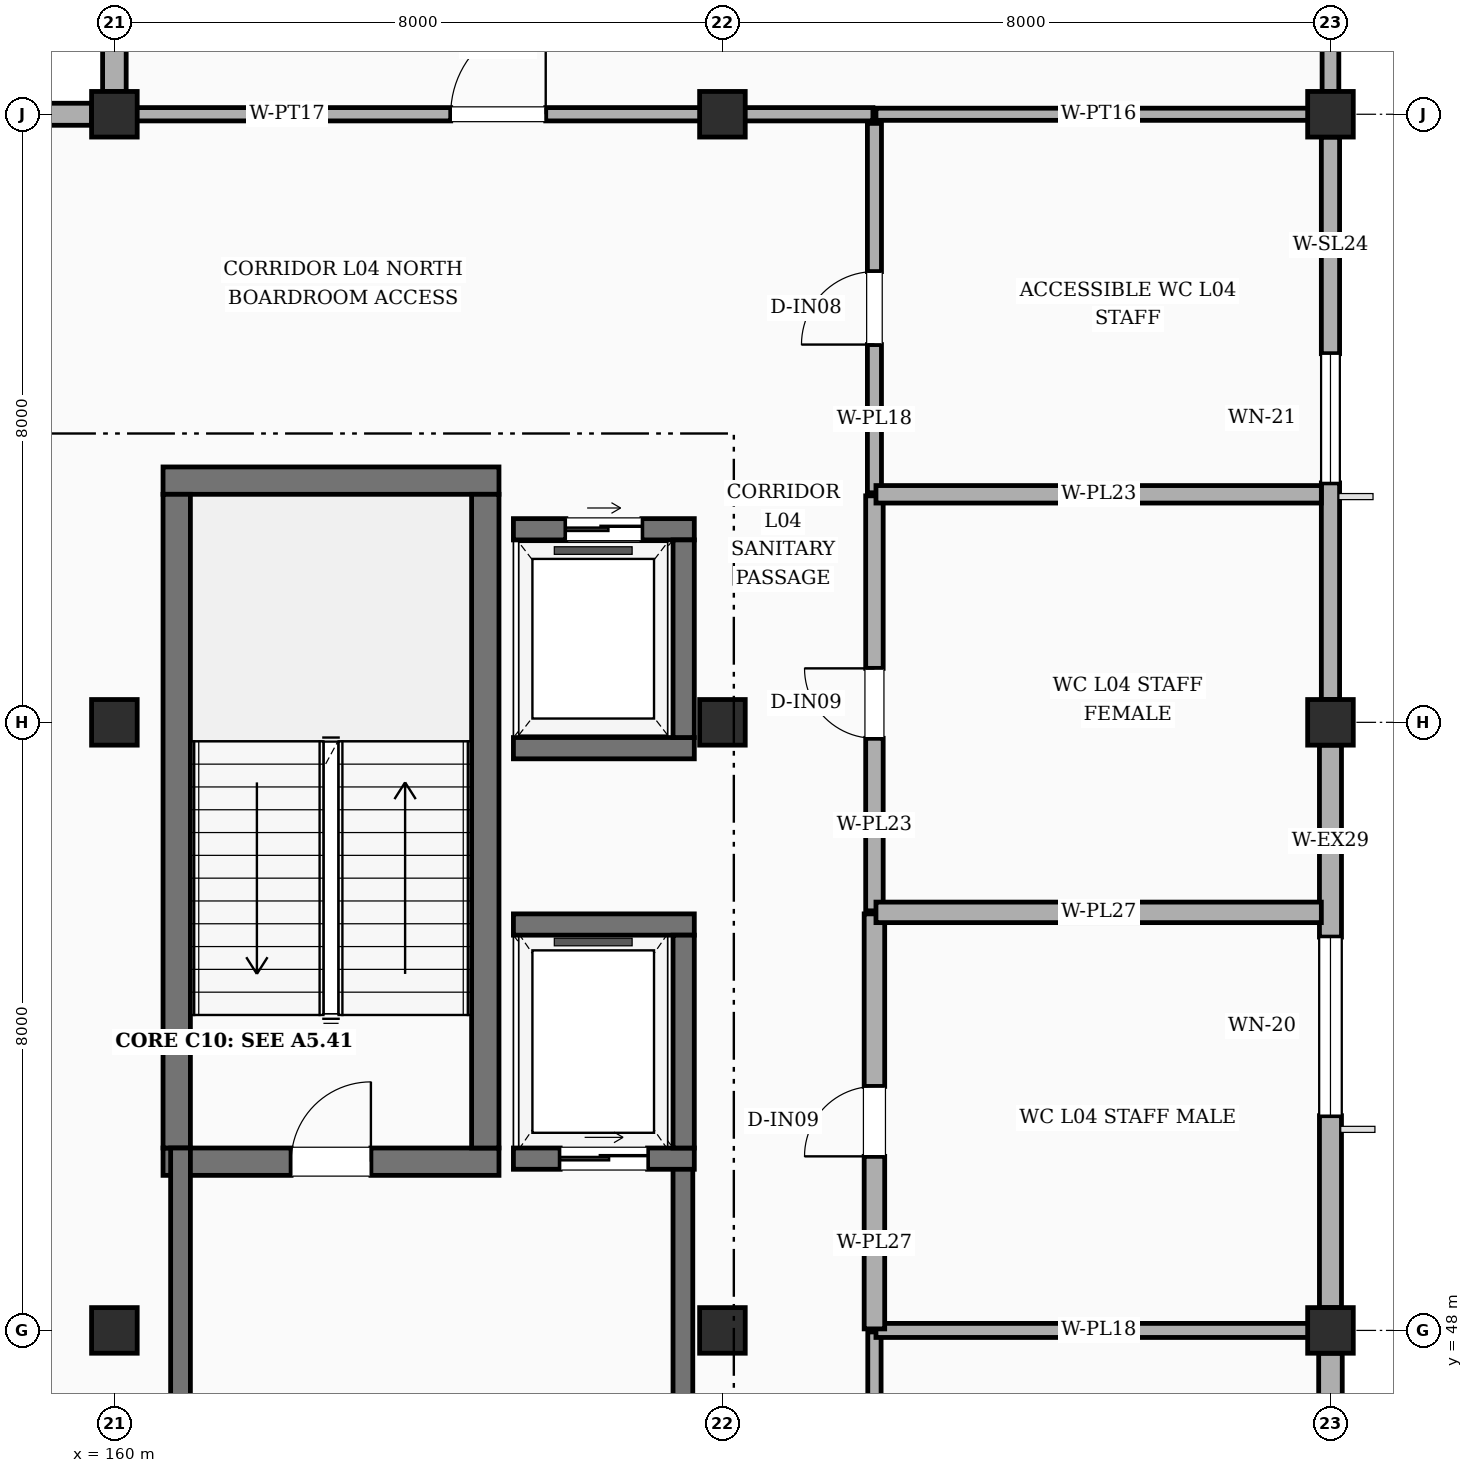
"""IFC4 building model, lengths in metres.
Left out: names, types, materials, properties, quantities, classifications, styles, units other than length and angle.
Written with IfcOpenShell. Run it as: python <this file> out.ifc"""

import sys

from ifc_helpers import new_model, si_unit, direction, frame, frame_2d, origin, origin_2d, place, context, subcontext, project, spatial, rectangle, extrude, element, fill, save


model = new_model("IFC4")
c1 = context("Model", 3, precision=1e-05, world=origin(), true_north=direction((0.0, 1.0)))
c2 = subcontext(c1, "Body", "Model", "MODEL_VIEW")
j1 = project(units=[si_unit("LENGTHUNIT", "METRE"), si_unit("PLANEANGLEUNIT", "RADIAN")], contexts=[c1])
p1 = place(None, origin())
s1 = spatial("IfcSite", under=j1, at=p1, CompositionType="ELEMENT")
p2 = place(p1, origin())
s2 = spatial("IfcBuilding", under=s1, at=p2, CompositionType="ELEMENT")
p3 = place(p2, frame((0.0, 0.0, 19.2)))
s3 = spatial("IfcBuildingStorey", under=s2, at=p3, CompositionType="ELEMENT", Elevation=19.2)
for number, where, z_axis, x_axis in (
    (1, (160.0, 48.0, 0.0), (0.0, 0.0, 1.0), (1.0, 0.0, 0.0)),
    (2, (160.0, 56.0, 0.0), (0.0, 0.0, 1.0), (1.0, 0.0, 0.0)),
    (3, (160.0, 64.0, 0.0), (0.0, 0.0, 1.0), (1.0, 0.0, 0.0)),
    (4, (168.0, 48.0, 0.0), (0.0, 0.0, 1.0), (1.0, 0.0, 0.0)),
    (5, (168.0, 56.0, 0.0), (0.0, 0.0, 1.0), (1.0, 0.0, 0.0)),
    (6, (168.0, 64.0, 0.0), (0.0, 0.0, 1.0), (1.0, 0.0, 0.0)),
    (7, (176.0, 48.0, 0.0), (0.0, 0.0, 1.0), (1.0, 0.0, 0.0)),
    (8, (176.0, 56.0, 0.0), (0.0, 0.0, 1.0), (1.0, 0.0, 0.0)),
    (9, (176.0, 64.0, 0.0), (0.0, 0.0, 1.0), (1.0, 0.0, 0.0)),
):
    element("IfcColumn", number, at=place(p3, frame(where, z_axis=z_axis, x_axis=x_axis)), inside=s3, PredefinedType="COLUMN", context=c2, shape_type="SweptSolid", body=[
        extrude(rectangle(XDim=0.6, YDim=0.6, at=origin_2d()), origin(), (0.0, 0.0, 1.0), 4.2),
    ])
p4 = place(p3, frame((176.0, 40.3, 0.0), z_axis=(0.0, 0.0, 1.0), x_axis=(0.0, 1.0, 0.0)))
e10 = element("IfcWall", 10, at=p4, inside=s3, PredefinedType="STANDARD", context=c2, shape_type="SweptSolid", body=[
    extrude(rectangle(XDim=7.4, YDim=0.31, at=frame_2d((3.7, 0.0))), origin(), (0.0, 0.0, 1.0), 3.57),
])
p5 = place(p4, frame((2.85, 0.0, 0.95)))
e11 = element("IfcOpeningElement", 11, at=p5, cuts=e10, PredefinedType="OPENING", context=c2, shape_type="SweptSolid", body=[
    extrude(rectangle(XDim=1.7, YDim=1.65, at=frame_2d((0.85, 0.825))), frame((0.0, 0.165, 0.0), z_axis=(0.0, -1.0, 0.0), x_axis=(1.0, 0.0, 0.0)), (0.0, 0.0, 1.0), 0.33),
])
p6 = place(p3, frame((176.0, 48.3, 0.0), z_axis=(0.0, 0.0, 1.0), x_axis=(0.0, 1.0, 0.0)))
e12 = element("IfcWall", 12, at=p6, inside=s3, PredefinedType="STANDARD", context=c2, shape_type="SweptSolid", body=[
    extrude(rectangle(XDim=7.4, YDim=0.29, at=frame_2d((3.7, 0.0))), origin(), (0.0, 0.0, 1.0), 3.57),
])
p7 = place(p6, frame((2.525, 0.0, 0.95)))
e13 = element("IfcOpeningElement", 13, at=p7, cuts=e12, PredefinedType="OPENING", context=c2, shape_type="SweptSolid", body=[
    extrude(rectangle(XDim=2.35, YDim=1.65, at=frame_2d((1.175, 0.825))), frame((0.0, 0.155, 0.0), z_axis=(0.0, -1.0, 0.0), x_axis=(1.0, 0.0, 0.0)), (0.0, 0.0, 1.0), 0.31),
])
p8 = place(p3, frame((176.0, 56.3, 0.0), z_axis=(0.0, 0.0, 1.0), x_axis=(0.0, 1.0, 0.0)))
e14 = element("IfcWall", 14, at=p8, inside=s3, PredefinedType="SOLIDWALL", context=c2, shape_type="SweptSolid", body=[
    extrude(rectangle(XDim=7.4, YDim=0.24, at=frame_2d((3.7, 0.0))), origin(), (0.0, 0.0, 1.0), 3.57),
])
p9 = place(p8, frame((2.85, 0.0, 0.95)))
e15 = element("IfcOpeningElement", 15, at=p9, cuts=e14, PredefinedType="OPENING", context=c2, shape_type="SweptSolid", body=[
    extrude(rectangle(XDim=1.7, YDim=1.65, at=frame_2d((0.85, 0.825))), frame((0.0, 0.13, 0.0), z_axis=(0.0, -1.0, 0.0), x_axis=(1.0, 0.0, 0.0)), (0.0, 0.0, 1.0), 0.26),
])
p10 = place(p3, frame((176.0, 64.3, 0.0), z_axis=(0.0, 0.0, 1.0), x_axis=(0.0, 1.0, 0.0)))
e16 = element("IfcWall", 16, at=p10, inside=s3, PredefinedType="SOLIDWALL", context=c2, shape_type="SweptSolid", body=[
    extrude(rectangle(XDim=7.4, YDim=0.22, at=frame_2d((3.7, 0.0))), origin(), (0.0, 0.0, 1.0), 3.57),
])
p11 = place(p10, frame((2.525, 0.0, 0.95)))
e17 = element("IfcOpeningElement", 17, at=p11, cuts=e16, PredefinedType="OPENING", context=c2, shape_type="SweptSolid", body=[
    extrude(rectangle(XDim=2.35, YDim=1.65, at=frame_2d((1.175, 0.825))), frame((0.0, 0.12, 0.0), z_axis=(0.0, -1.0, 0.0), x_axis=(1.0, 0.0, 0.0)), (0.0, 0.0, 1.0), 0.24),
])
p12 = place(p3, frame((160.0, 71.7, 0.0), z_axis=(0.0, 0.0, 1.0), x_axis=(0.0, -1.0, 0.0)))
e18 = element("IfcWall", 18, at=p12, inside=s3, PredefinedType="STANDARD", context=c2, shape_type="SweptSolid", body=[
    extrude(rectangle(XDim=7.4, YDim=0.31, at=frame_2d((3.7, 0.0))), origin(), (0.0, 0.0, 1.0), 3.57),
])
p13 = place(p12, frame((2.85, 0.0, 0.95)))
e19 = element("IfcOpeningElement", 19, at=p13, cuts=e18, PredefinedType="OPENING", context=c2, shape_type="SweptSolid", body=[
    extrude(rectangle(XDim=1.7, YDim=1.65, at=frame_2d((0.85, 0.825))), frame((0.0, 0.165, 0.0), z_axis=(0.0, -1.0, 0.0), x_axis=(1.0, 0.0, 0.0)), (0.0, 0.0, 1.0), 0.33),
])
p14 = place(p3, frame((159.7, 64.0, 0.0), z_axis=(0.0, 0.0, 1.0), x_axis=(-1.0, 0.0, 0.0)))
e20 = element("IfcWall", 20, at=p14, inside=s3, PredefinedType="STANDARD", context=c2, shape_type="SweptSolid", body=[
    extrude(rectangle(XDim=7.4, YDim=0.29, at=frame_2d((3.7, 0.0))), origin(), (0.0, 0.0, 1.0), 3.57),
])
p15 = place(p14, frame((2.525, 0.0, 0.95)))
e21 = element("IfcOpeningElement", 21, at=p15, cuts=e20, PredefinedType="OPENING", context=c2, shape_type="SweptSolid", body=[
    extrude(rectangle(XDim=2.35, YDim=1.65, at=frame_2d((1.175, 0.825))), frame((0.0, 0.155, 0.0), z_axis=(0.0, -1.0, 0.0), x_axis=(1.0, 0.0, 0.0)), (0.0, 0.0, 1.0), 0.31),
])
p16 = place(p3, frame((160.64, 50.22, 0.0), z_axis=(0.0, 0.0, 1.0), x_axis=(1.0, 0.0, 0.0)))
e22 = element("IfcWall", 22, at=p16, inside=s3, PredefinedType="SHEAR", context=c2, shape_type="SweptSolid", body=[
    extrude(rectangle(XDim=4.42, YDim=0.36, at=frame_2d((2.21, 0.0))), origin(), (0.0, 0.0, 1.0), 4.2),
])
p17 = place(p16, frame((1.685, 0.0, 0.0)))
e23 = element("IfcOpeningElement", 23, at=p17, cuts=e22, PredefinedType="OPENING", context=c2, shape_type="SweptSolid", body=[
    extrude(rectangle(XDim=1.05, YDim=2.15, at=frame_2d((0.525, 1.075))), frame((0.0, 0.19, 0.0), z_axis=(0.0, -1.0, 0.0), x_axis=(1.0, 0.0, 0.0)), (0.0, 0.0, 1.0), 0.38),
])
p18 = place(p3, frame((160.64, 59.18, 0.0), z_axis=(0.0, 0.0, 1.0), x_axis=(1.0, 0.0, 0.0)))
e24 = element("IfcWall", 24, at=p18, inside=s3, PredefinedType="SHEAR", context=c2, shape_type="SweptSolid", body=[
    extrude(rectangle(XDim=4.42, YDim=0.36, at=frame_2d((2.21, 0.0))), origin(), (0.0, 0.0, 1.0), 4.2),
])
for number, where, z_axis, x_axis in (
    (25, (160.82, 50.4, 0.0), (0.0, 0.0, 1.0), (0.0, 1.0, 0.0)),
    (26, (164.88, 50.4, 0.0), (0.0, 0.0, 1.0), (0.0, 1.0, 0.0)),
):
    element("IfcWall", number, at=place(p3, frame(where, z_axis=z_axis, x_axis=x_axis)), inside=s3, PredefinedType="SHEAR", context=c2, shape_type="SweptSolid", body=[
        extrude(rectangle(XDim=8.6, YDim=0.36, at=frame_2d((4.3, 0.0))), origin(), (0.0, 0.0, 1.0), 4.2),
    ])
for number, where, z_axis, x_axis in (
    (27, (160.87, 46.54, 0.0), (0.0, 0.0, 1.0), (0.0, 1.0, 0.0)),
    (28, (167.48, 46.54, 0.0), (0.0, 0.0, 1.0), (0.0, 1.0, 0.0)),
):
    element("IfcWall", number, at=place(p3, frame(where, z_axis=z_axis, x_axis=x_axis)), inside=s3, PredefinedType="SHEAR", context=c2, shape_type="SweptSolid", body=[
        extrude(rectangle(XDim=3.86, YDim=0.26, at=frame_2d((1.93, 0.0))), origin(), (0.0, 0.0, 1.0), 4.2),
    ])
p19 = place(p3, frame((165.25, 50.26, 0.0), z_axis=(0.0, 0.0, 1.0), x_axis=(1.0, 0.0, 0.0)))
e29 = element("IfcWall", 29, at=p19, inside=s3, PredefinedType="SHEAR", context=c2, shape_type="SweptSolid", body=[
    extrude(rectangle(XDim=2.38, YDim=0.28, at=frame_2d((1.19, 0.0))), origin(), (0.0, 0.0, 1.0), 4.2),
])
p20 = place(p19, frame((0.615, 0.0, 0.0)))
e30 = element("IfcOpeningElement", 30, at=p20, cuts=e29, PredefinedType="OPENING", context=c2, shape_type="SweptSolid", body=[
    extrude(rectangle(XDim=1.15, YDim=2.2, at=frame_2d((0.575, 1.1))), frame((0.0, 0.15, 0.0), z_axis=(0.0, -1.0, 0.0), x_axis=(1.0, 0.0, 0.0)), (0.0, 0.0, 1.0), 0.3),
])
p21 = place(p3, frame((165.25, 53.34, 0.0), z_axis=(0.0, 0.0, 1.0), x_axis=(1.0, 0.0, 0.0)))
e31 = element("IfcWall", 31, at=p21, inside=s3, PredefinedType="SHEAR", context=c2, shape_type="SweptSolid", body=[
    extrude(rectangle(XDim=2.38, YDim=0.28, at=frame_2d((1.19, 0.0))), origin(), (0.0, 0.0, 1.0), 4.2),
])
p22 = place(p3, frame((167.49, 50.4, 0.0), z_axis=(0.0, 0.0, 1.0), x_axis=(0.0, 1.0, 0.0)))
e32 = element("IfcWall", 32, at=p22, inside=s3, PredefinedType="SHEAR", context=c2, shape_type="SweptSolid", body=[
    extrude(rectangle(XDim=2.8, YDim=0.28, at=frame_2d((1.4, 0.0))), origin(), (0.0, 0.0, 1.0), 4.2),
])
p23 = place(p3, frame((165.25, 55.66, 0.0), z_axis=(0.0, 0.0, 1.0), x_axis=(1.0, 0.0, 0.0)))
e33 = element("IfcWall", 33, at=p23, inside=s3, PredefinedType="SHEAR", context=c2, shape_type="SweptSolid", body=[
    extrude(rectangle(XDim=2.38, YDim=0.28, at=frame_2d((1.19, 0.0))), origin(), (0.0, 0.0, 1.0), 4.2),
])
p24 = place(p3, frame((165.25, 58.54, 0.0), z_axis=(0.0, 0.0, 1.0), x_axis=(1.0, 0.0, 0.0)))
e34 = element("IfcWall", 34, at=p24, inside=s3, PredefinedType="SHEAR", context=c2, shape_type="SweptSolid", body=[
    extrude(rectangle(XDim=2.38, YDim=0.28, at=frame_2d((1.19, 0.0))), origin(), (0.0, 0.0, 1.0), 4.2),
])
p25 = place(p24, frame((0.69, 0.0, 0.0)))
e35 = element("IfcOpeningElement", 35, at=p25, cuts=e34, PredefinedType="OPENING", context=c2, shape_type="SweptSolid", body=[
    extrude(rectangle(XDim=1.0, YDim=2.15, at=frame_2d((0.5, 1.075))), frame((0.0, 0.15, 0.0), z_axis=(0.0, -1.0, 0.0), x_axis=(1.0, 0.0, 0.0)), (0.0, 0.0, 1.0), 0.3),
])
p26 = place(p3, frame((167.49, 55.8, 0.0), z_axis=(0.0, 0.0, 1.0), x_axis=(0.0, 1.0, 0.0)))
e36 = element("IfcWall", 36, at=p26, inside=s3, PredefinedType="SHEAR", context=c2, shape_type="SweptSolid", body=[
    extrude(rectangle(XDim=2.6, YDim=0.28, at=frame_2d((1.3, 0.0))), origin(), (0.0, 0.0, 1.0), 4.2),
])
p27 = place(p3, frame((170.0, 24.02, 0.0), z_axis=(0.0, 0.0, 1.0), x_axis=(0.0, 1.0, 0.0)))
e37 = element("IfcWall", 37, at=p27, inside=s3, PredefinedType="PARTITIONING", context=c2, shape_type="SweptSolid", body=[
    extrude(rectangle(XDim=23.96, YDim=0.175, at=frame_2d((11.98, 0.0))), origin(), (0.0, 0.0, 1.0), 3.37),
])
p28 = place(p27, frame((11.44, 0.0, 0.0)))
e38 = element("IfcOpeningElement", 38, at=p28, cuts=e37, PredefinedType="OPENING", context=c2, shape_type="SweptSolid", body=[
    extrude(rectangle(XDim=1.08, YDim=2.15, at=frame_2d((0.54, 1.075))), frame((0.0, 0.097, 0.0), z_axis=(0.0, -1.0, 0.0), x_axis=(1.0, 0.0, 0.0)), (0.0, 0.0, 1.0), 0.195),
])
p29 = place(p3, frame((170.02, 48.0, 0.0), z_axis=(0.0, 0.0, 1.0), x_axis=(1.0, 0.0, 0.0)))
e39 = element("IfcWall", 39, at=p29, inside=s3, PredefinedType="PLUMBINGWALL", context=c2, shape_type="SweptSolid", body=[
    extrude(rectangle(XDim=5.86, YDim=0.185, at=frame_2d((2.93, 0.0))), origin(), (0.0, 0.0, 1.0), 3.37),
])
p30 = place(p3, frame((170.0, 48.02, 0.0), z_axis=(0.0, 0.0, 1.0), x_axis=(0.0, 1.0, 0.0)))
e40 = element("IfcWall", 40, at=p30, inside=s3, PredefinedType="PLUMBINGWALL", context=c2, shape_type="SweptSolid", body=[
    extrude(rectangle(XDim=5.46, YDim=0.27, at=frame_2d((2.73, 0.0))), origin(), (0.0, 0.0, 1.0), 3.37),
])
p31 = place(p30, frame((2.27, 0.0, 0.0)))
e41 = element("IfcOpeningElement", 41, at=p31, cuts=e40, PredefinedType="OPENING", context=c2, shape_type="SweptSolid", body=[
    extrude(rectangle(XDim=0.92, YDim=2.1, at=frame_2d((0.46, 1.05))), frame((0.0, 0.145, 0.0), z_axis=(0.0, -1.0, 0.0), x_axis=(1.0, 0.0, 0.0)), (0.0, 0.0, 1.0), 0.29),
])
p32 = place(p3, frame((170.0, 53.52, 0.0), z_axis=(0.0, 0.0, 1.0), x_axis=(0.0, 1.0, 0.0)))
e42 = element("IfcWall", 42, at=p32, inside=s3, PredefinedType="PLUMBINGWALL", context=c2, shape_type="SweptSolid", body=[
    extrude(rectangle(XDim=5.46, YDim=0.23, at=frame_2d((2.73, 0.0))), origin(), (0.0, 0.0, 1.0), 3.37),
])
p33 = place(p32, frame((2.27, 0.0, 0.0)))
e43 = element("IfcOpeningElement", 43, at=p33, cuts=e42, PredefinedType="OPENING", context=c2, shape_type="SweptSolid", body=[
    extrude(rectangle(XDim=0.92, YDim=2.1, at=frame_2d((0.46, 1.05))), frame((0.0, 0.125, 0.0), z_axis=(0.0, -1.0, 0.0), x_axis=(1.0, 0.0, 0.0)), (0.0, 0.0, 1.0), 0.25),
])
p34 = place(p3, frame((170.0, 59.02, 0.0), z_axis=(0.0, 0.0, 1.0), x_axis=(0.0, 1.0, 0.0)))
e44 = element("IfcWall", 44, at=p34, inside=s3, PredefinedType="PLUMBINGWALL", context=c2, shape_type="SweptSolid", body=[
    extrude(rectangle(XDim=4.86, YDim=0.185, at=frame_2d((2.43, 0.0))), origin(), (0.0, 0.0, 1.0), 3.37),
])
p35 = place(p34, frame((1.95, 0.0, 0.0)))
e45 = element("IfcOpeningElement", 45, at=p35, cuts=e44, PredefinedType="OPENING", context=c2, shape_type="SweptSolid", body=[
    extrude(rectangle(XDim=0.96, YDim=2.1, at=frame_2d((0.48, 1.05))), frame((0.0, 0.103, 0.0), z_axis=(0.0, -1.0, 0.0), x_axis=(1.0, 0.0, 0.0)), (0.0, 0.0, 1.0), 0.205),
])
p36 = place(p3, frame((170.02, 53.5, 0.0), z_axis=(0.0, 0.0, 1.0), x_axis=(1.0, 0.0, 0.0)))
e46 = element("IfcWall", 46, at=p36, inside=s3, PredefinedType="PLUMBINGWALL", context=c2, shape_type="SweptSolid", body=[
    extrude(rectangle(XDim=5.86, YDim=0.27, at=frame_2d((2.93, 0.0))), origin(), (0.0, 0.0, 1.0), 3.57),
])
p37 = place(p3, frame((170.02, 59.0, 0.0), z_axis=(0.0, 0.0, 1.0), x_axis=(1.0, 0.0, 0.0)))
e47 = element("IfcWall", 47, at=p37, inside=s3, PredefinedType="PLUMBINGWALL", context=c2, shape_type="SweptSolid", body=[
    extrude(rectangle(XDim=5.86, YDim=0.23, at=frame_2d((2.93, 0.0))), origin(), (0.0, 0.0, 1.0), 3.57),
])
p38 = place(p3, frame((160.12, 64.0, 0.0), z_axis=(0.0, 0.0, 1.0), x_axis=(1.0, 0.0, 0.0)))
e48 = element("IfcWall", 48, at=p38, inside=s3, PredefinedType="PARTITIONING", context=c2, shape_type="SweptSolid", body=[
    extrude(rectangle(XDim=9.86, YDim=0.175, at=frame_2d((4.93, 0.0))), origin(), (0.0, 0.0, 1.0), 3.37),
])
p39 = place(p38, frame((4.305, 0.0, 0.0)))
e49 = element("IfcOpeningElement", 49, at=p39, cuts=e48, PredefinedType="OPENING", context=c2, shape_type="SweptSolid", body=[
    extrude(rectangle(XDim=1.25, YDim=2.15, at=frame_2d((0.625, 1.075))), frame((0.0, 0.097, 0.0), z_axis=(0.0, -1.0, 0.0), x_axis=(1.0, 0.0, 0.0)), (0.0, 0.0, 1.0), 0.195),
])
p40 = place(p3, frame((170.02, 64.0, 0.0), z_axis=(0.0, 0.0, 1.0), x_axis=(1.0, 0.0, 0.0)))
e50 = element("IfcWall", 50, at=p40, inside=s3, PredefinedType="PARTITIONING", context=c2, shape_type="SweptSolid", body=[
    extrude(rectangle(XDim=5.86, YDim=0.16, at=frame_2d((2.93, 0.0))), origin(), (0.0, 0.0, 1.0), 3.37),
])
p41 = place(p7, origin())
e51 = element("IfcWindow", 51, at=p41, inside=s3, PartitioningType="SINGLE_PANEL", PredefinedType="WINDOW", context=c2, shape_type="SweptSolid", body=[
    extrude(rectangle(XDim=2.35, YDim=1.65, at=frame_2d((1.175, 0.825))), frame((0.0, 0.03, 0.0), z_axis=(0.0, -1.0, 0.0), x_axis=(1.0, 0.0, 0.0)), (0.0, 0.0, 1.0), 0.06),
])
fill(e13, e51)
p42 = place(p9, origin())
e52 = element("IfcWindow", 52, at=p42, inside=s3, PartitioningType="SINGLE_PANEL", PredefinedType="WINDOW", context=c2, shape_type="SweptSolid", body=[
    extrude(rectangle(XDim=1.7, YDim=1.65, at=frame_2d((0.85, 0.825))), frame((0.0, 0.03, 0.0), z_axis=(0.0, -1.0, 0.0), x_axis=(1.0, 0.0, 0.0)), (0.0, 0.0, 1.0), 0.06),
])
fill(e15, e52)
p43 = place(p17, origin())
e53 = element("IfcDoor", 53, at=p43, inside=s3, OperationType="SINGLE_SWING_RIGHT", PredefinedType="DOOR", context=c2, shape_type="SweptSolid", body=[
    extrude(rectangle(XDim=1.05, YDim=2.15, at=frame_2d((0.525, 1.075))), frame((0.0, 0.025, 0.0), z_axis=(0.0, -1.0, 0.0), x_axis=(1.0, 0.0, 0.0)), (0.0, 0.0, 1.0), 0.05),
])
fill(e23, e53)
p44 = place(p20, origin())
e54 = element("IfcDoor", 54, at=p44, inside=s3, OperationType="SLIDING_TO_LEFT", PredefinedType="DOOR", context=c2, shape_type="SweptSolid", body=[
    extrude(rectangle(XDim=1.15, YDim=2.2, at=frame_2d((0.575, 1.1))), frame((0.0, 0.025, 0.0), z_axis=(0.0, -1.0, 0.0), x_axis=(1.0, 0.0, 0.0)), (0.0, 0.0, 1.0), 0.05),
])
fill(e30, e54)
p45 = place(p25, origin())
e55 = element("IfcDoor", 55, at=p45, inside=s3, OperationType="SLIDING_TO_LEFT", PredefinedType="DOOR", context=c2, shape_type="SweptSolid", body=[
    extrude(rectangle(XDim=1.0, YDim=2.15, at=frame_2d((0.5, 1.075))), frame((0.0, 0.025, 0.0), z_axis=(0.0, -1.0, 0.0), x_axis=(1.0, 0.0, 0.0)), (0.0, 0.0, 1.0), 0.05),
])
fill(e35, e55)
p46 = place(p31, origin())
e56 = element("IfcDoor", 56, at=p46, inside=s3, OperationType="SINGLE_SWING_LEFT", PredefinedType="DOOR", context=c2, shape_type="SweptSolid", body=[
    extrude(rectangle(XDim=0.92, YDim=2.1, at=frame_2d((0.46, 1.05))), frame((0.0, 0.025, 0.0), z_axis=(0.0, -1.0, 0.0), x_axis=(1.0, 0.0, 0.0)), (0.0, 0.0, 1.0), 0.05),
])
fill(e41, e56)
p47 = place(p33, origin())
e57 = element("IfcDoor", 57, at=p47, inside=s3, OperationType="SINGLE_SWING_RIGHT", PredefinedType="DOOR", context=c2, shape_type="SweptSolid", body=[
    extrude(rectangle(XDim=0.92, YDim=2.1, at=frame_2d((0.46, 1.05))), frame((0.0, 0.025, 0.0), z_axis=(0.0, -1.0, 0.0), x_axis=(1.0, 0.0, 0.0)), (0.0, 0.0, 1.0), 0.05),
])
fill(e43, e57)
p48 = place(p35, origin())
e58 = element("IfcDoor", 58, at=p48, inside=s3, OperationType="SINGLE_SWING_LEFT", PredefinedType="DOOR", context=c2, shape_type="SweptSolid", body=[
    extrude(rectangle(XDim=0.96, YDim=2.1, at=frame_2d((0.48, 1.05))), frame((0.0, 0.025, 0.0), z_axis=(0.0, -1.0, 0.0), x_axis=(1.0, 0.0, 0.0)), (0.0, 0.0, 1.0), 0.05),
])
fill(e45, e58)
p49 = place(p39, origin())
e59 = element("IfcDoor", 59, at=p49, inside=s3, OperationType="SINGLE_SWING_RIGHT", PredefinedType="DOOR", context=c2, shape_type="SweptSolid", body=[
    extrude(rectangle(XDim=1.25, YDim=2.15, at=frame_2d((0.625, 1.075))), frame((0.0, 0.025, 0.0), z_axis=(0.0, -1.0, 0.0), x_axis=(1.0, 0.0, 0.0)), (0.0, 0.0, 1.0), 0.05),
])
fill(e49, e59)
save(model, sys.argv[1])
